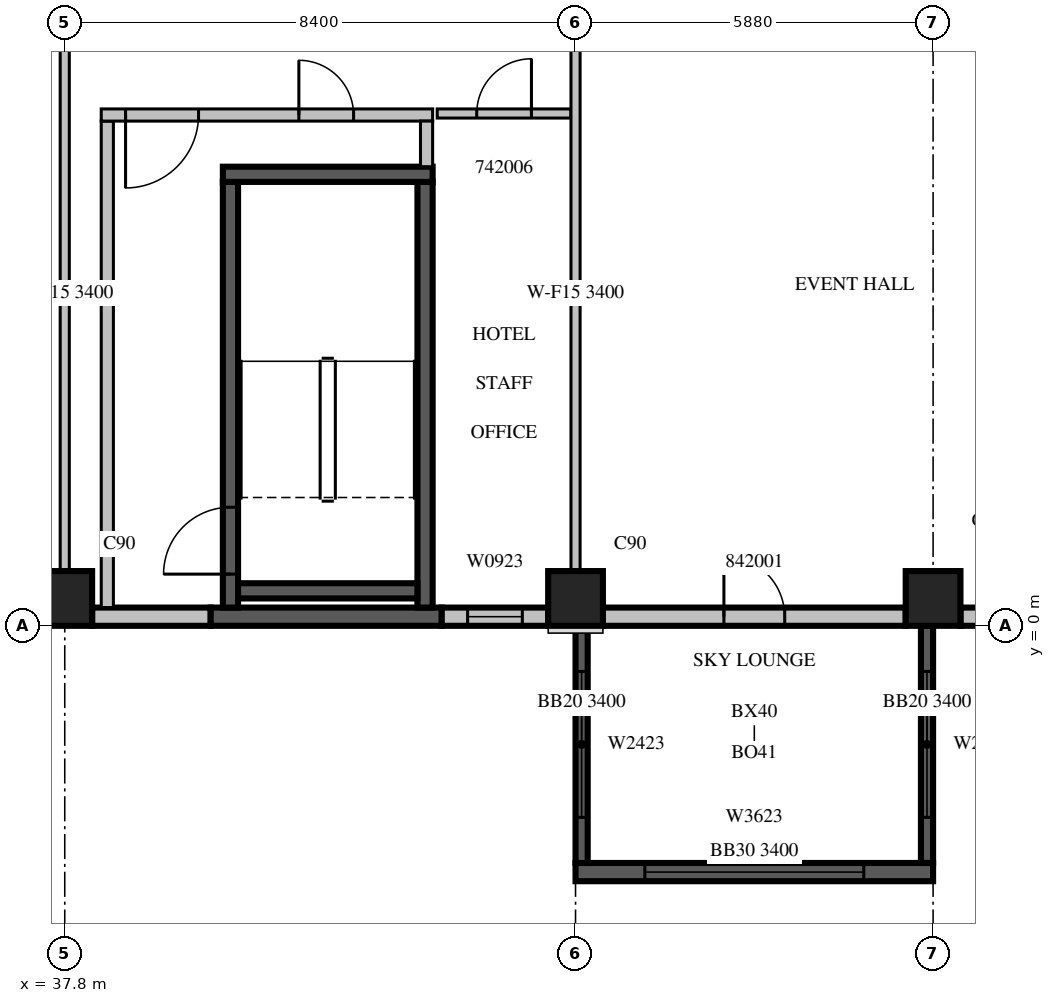
"""IFC4 building model, lengths in metres.
Left out: names, types, materials, properties, quantities, classifications, styles, units other than length and angle.
Written with IfcOpenShell. Run it as: python <this file> out.ifc"""

import sys

from ifc_helpers import new_model, si_unit, direction, frame, frame_2d, origin, origin_2d, place, context, subcontext, project, spatial, rectangle, extrude, source, transform, mapped, element, fill, save


model = new_model("IFC4")
c1 = context("Model", 3, precision=1e-05, world=origin(), true_north=direction((0.0, 1.0)))
c2 = subcontext(c1, "Body", "Model", "MODEL_VIEW")
j1 = project(units=[si_unit("LENGTHUNIT", "METRE"), si_unit("PLANEANGLEUNIT", "RADIAN")], contexts=[c1])
p1 = place(None, origin())
s1 = spatial("IfcSite", under=j1, at=p1, CompositionType="ELEMENT")
p2 = place(p1, origin())
s2 = spatial("IfcBuilding", under=s1, at=p2, CompositionType="ELEMENT")
p3 = place(p2, frame((0.0, 0.0, 193.0)))
s3 = spatial("IfcBuildingStorey", under=s2, at=p3, CompositionType="ELEMENT", Elevation=193.0)
m1 = source(origin(), c2, "Body", "SweptSolid", [
    extrude(rectangle(XDim=0.9, YDim=0.9, at=origin_2d()), origin(), (0.0, 0.0, 1.0), 3.8),
])
for number, where, z_axis, x_axis in (
    (1, (37.8, 0.45, 0.0), (0.0, 0.0, 1.0), (1.0, 0.0, 0.0)),
    (2, (46.2, 0.45, 0.0), (0.0, 0.0, 1.0), (1.0, 0.0, 0.0)),
    (3, (52.08, 0.45, 0.0), (0.0, 0.0, 1.0), (1.0, 0.0, 0.0)),
):
    element("IfcColumn", number, at=place(p3, frame(where, z_axis=z_axis, x_axis=x_axis)), inside=s3, PredefinedType="COLUMN", context=c2, shape_type="MappedRepresentation", body=[
        mapped(m1, transform((0.0, 0.0, 0.0), scale=1.0)),
    ])
m2 = source(origin(), c2, "Body", "SweptSolid", [
    extrude(rectangle(XDim=5.88, YDim=0.3, at=frame_2d((2.94, 0.0))), origin(), (0.0, 0.0, 1.0), 3.4),
])
p4 = place(p3, frame((46.2, -4.05, 0.0), z_axis=(0.0, 0.0, 1.0), x_axis=(1.0, 0.0, 0.0)))
e4 = element("IfcWall", 4, at=p4, inside=s3, PredefinedType="SOLIDWALL", context=c2, shape_type="MappedRepresentation", body=[
    mapped(m2, transform((0.0, 0.0, 0.0), scale=1.0)),
])
m3 = source(origin(), c2, "Body", "SweptSolid", [
    extrude(rectangle(XDim=3.6, YDim=2.3, at=frame_2d((1.8, 1.15))), frame((0.0, 0.16, 0.0), z_axis=(0.0, -1.0, 0.0), x_axis=(1.0, 0.0, 0.0)), (0.0, 0.0, 1.0), 0.32),
])
p5 = place(p4, frame((1.14, 0.0, 0.6)))
e5 = element("IfcOpeningElement", 5, at=p5, cuts=e4, PredefinedType="OPENING", context=c2, shape_type="MappedRepresentation", body=[
    mapped(m3, transform((0.0, 0.0, 0.0), scale=1.0)),
])
m4 = source(origin(), c2, "Body", "SweptSolid", [
    extrude(rectangle(XDim=3.9, YDim=0.2, at=frame_2d((1.95, 0.0))), origin(), (0.0, 0.0, 1.0), 3.4),
])
p6 = place(p3, frame((46.3, 0.0, 0.0), z_axis=(0.0, 0.0, 1.0), x_axis=(0.0, -1.0, 0.0)))
e6 = element("IfcWall", 6, at=p6, inside=s3, PredefinedType="SOLIDWALL", context=c2, shape_type="MappedRepresentation", body=[
    mapped(m4, transform((0.0, 0.0, 0.0), scale=1.0)),
])
m5 = source(origin(), c2, "Body", "SweptSolid", [
    extrude(rectangle(XDim=2.4, YDim=2.3, at=frame_2d((1.2, 1.15))), frame((0.0, 0.11, 0.0), z_axis=(0.0, -1.0, 0.0), x_axis=(1.0, 0.0, 0.0)), (0.0, 0.0, 1.0), 0.22),
])
p7 = place(p6, frame((0.75, 0.0, 0.6)))
e7 = element("IfcOpeningElement", 7, at=p7, cuts=e6, PredefinedType="OPENING", context=c2, shape_type="MappedRepresentation", body=[
    mapped(m5, transform((0.0, 0.0, 0.0), scale=1.0)),
])
p8 = place(p3, frame((51.98, 0.0, 0.0), z_axis=(0.0, 0.0, 1.0), x_axis=(0.0, -1.0, 0.0)))
e8 = element("IfcWall", 8, at=p8, inside=s3, PredefinedType="SOLIDWALL", context=c2, shape_type="MappedRepresentation", body=[
    mapped(m4, transform((0.0, 0.0, 0.0), scale=1.0)),
])
p9 = place(p8, frame((0.75, 0.0, 0.6)))
e9 = element("IfcOpeningElement", 9, at=p9, cuts=e8, PredefinedType="OPENING", context=c2, shape_type="MappedRepresentation", body=[
    mapped(m5, transform((0.0, 0.0, 0.0), scale=1.0)),
])
m6 = source(origin(), c2, "Body", "SweptSolid", [
    extrude(rectangle(XDim=1.95, YDim=0.3, at=frame_2d((0.975, 0.0))), origin(), (0.0, 0.0, 1.0), 3.4),
])
p10 = place(p3, frame((38.25, 0.15, 0.0), z_axis=(0.0, 0.0, 1.0), x_axis=(1.0, 0.0, 0.0)))
e10 = element("IfcWall", 10, at=p10, inside=s3, PredefinedType="STANDARD", context=c2, shape_type="MappedRepresentation", body=[
    mapped(m6, transform((0.0, 0.0, 0.0), scale=1.0)),
])
m7 = source(origin(), c2, "Body", "SweptSolid", [
    extrude(rectangle(XDim=3.8, YDim=0.3, at=frame_2d((1.9, 0.0))), origin(), (0.0, 0.0, 1.0), 3.4),
])
p11 = place(p3, frame((40.2, 0.15, 0.0), z_axis=(0.0, 0.0, 1.0), x_axis=(1.0, 0.0, 0.0)))
e11 = element("IfcWall", 11, at=p11, inside=s3, PredefinedType="SOLIDWALL", context=c2, shape_type="MappedRepresentation", body=[
    mapped(m7, transform((0.0, 0.0, 0.0), scale=1.0)),
])
m8 = source(origin(), c2, "Body", "SweptSolid", [
    extrude(rectangle(XDim=1.75, YDim=0.3, at=frame_2d((0.875, 0.0))), origin(), (0.0, 0.0, 1.0), 3.4),
])
p12 = place(p3, frame((44.0, 0.15, 0.0), z_axis=(0.0, 0.0, 1.0), x_axis=(1.0, 0.0, 0.0)))
e12 = element("IfcWall", 12, at=p12, inside=s3, PredefinedType="STANDARD", context=c2, shape_type="MappedRepresentation", body=[
    mapped(m8, transform((0.0, 0.0, 0.0), scale=1.0)),
])
m9 = source(origin(), c2, "Body", "SweptSolid", [
    extrude(rectangle(XDim=0.9, YDim=2.3, at=frame_2d((0.45, 1.15))), frame((0.0, 0.16, 0.0), z_axis=(0.0, -1.0, 0.0), x_axis=(1.0, 0.0, 0.0)), (0.0, 0.0, 1.0), 0.32),
])
p13 = place(p12, frame((0.425, 0.0, 0.6)))
e13 = element("IfcOpeningElement", 13, at=p13, cuts=e12, PredefinedType="OPENING", context=c2, shape_type="MappedRepresentation", body=[
    mapped(m9, transform((0.0, 0.0, 0.0), scale=1.0)),
])
m10 = source(origin(), c2, "Body", "SweptSolid", [
    extrude(rectangle(XDim=4.98, YDim=0.3, at=frame_2d((2.49, 0.0))), origin(), (0.0, 0.0, 1.0), 3.4),
])
p14 = place(p3, frame((46.65, 0.15, 0.0), z_axis=(0.0, 0.0, 1.0), x_axis=(1.0, 0.0, 0.0)))
e14 = element("IfcWall", 14, at=p14, inside=s3, PredefinedType="STANDARD", context=c2, shape_type="MappedRepresentation", body=[
    mapped(m10, transform((0.0, 0.0, 0.0), scale=1.0)),
])
m11 = source(origin(), c2, "Body", "SweptSolid", [
    extrude(rectangle(XDim=1.0, YDim=2.1, at=frame_2d((0.5, 1.05))), frame((0.0, 0.16, 0.0), z_axis=(0.0, -1.0, 0.0), x_axis=(1.0, 0.0, 0.0)), (0.0, 0.0, 1.0), 0.32),
])
p15 = place(p14, frame((1.99, 0.0, 0.0)))
e15 = element("IfcOpeningElement", 15, at=p15, cuts=e14, PredefinedType="OPENING", context=c2, shape_type="MappedRepresentation", body=[
    mapped(m11, transform((0.0, 0.0, 0.0), scale=1.0)),
])
m12 = source(origin(), c2, "Body", "SweptSolid", [
    extrude(rectangle(XDim=2.91, YDim=0.3, at=frame_2d((1.455, 0.0))), origin(), (0.0, 0.0, 1.0), 3.4),
])
p16 = place(p3, frame((52.53, 0.15, 0.0), z_axis=(0.0, 0.0, 1.0), x_axis=(1.0, 0.0, 0.0)))
e16 = element("IfcWall", 16, at=p16, inside=s3, PredefinedType="STANDARD", context=c2, shape_type="MappedRepresentation", body=[
    mapped(m12, transform((0.0, 0.0, 0.0), scale=1.0)),
])
m13 = source(origin(), c2, "Body", "SweptSolid", [
    extrude(rectangle(XDim=1.8, YDim=2.3, at=frame_2d((0.9, 1.15))), frame((0.0, 0.16, 0.0), z_axis=(0.0, -1.0, 0.0), x_axis=(1.0, 0.0, 0.0)), (0.0, 0.0, 1.0), 0.32),
])
p17 = place(p16, frame((0.33, 0.0, 0.6)))
e17 = element("IfcOpeningElement", 17, at=p17, cuts=e16, PredefinedType="OPENING", context=c2, shape_type="MappedRepresentation", body=[
    mapped(m13, transform((0.0, 0.0, 0.0), scale=1.0)),
])
m14 = source(origin(), c2, "Body", "SweptSolid", [
    extrude(rectangle(XDim=7.0, YDim=0.25, at=frame_2d((3.5, 0.0))), origin(), (0.0, 0.0, 1.0), 3.4),
])
p18 = place(p3, frame((40.525, 0.3, 0.0), z_axis=(0.0, 0.0, 1.0), x_axis=(0.0, 1.0, 0.0)))
e18 = element("IfcWall", 18, at=p18, inside=s3, PredefinedType="SOLIDWALL", context=c2, shape_type="MappedRepresentation", body=[
    mapped(m14, transform((0.0, 0.0, 0.0), scale=1.0)),
])
m15 = source(origin(), c2, "Body", "SweptSolid", [
    extrude(rectangle(XDim=1.1, YDim=2.1, at=frame_2d((0.55, 1.05))), frame((0.0, 0.135, 0.0), z_axis=(0.0, -1.0, 0.0), x_axis=(1.0, 0.0, 0.0)), (0.0, 0.0, 1.0), 0.27),
])
p19 = place(p18, frame((0.55, 0.0, 0.0)))
e19 = element("IfcOpeningElement", 19, at=p19, cuts=e18, PredefinedType="OPENING", context=c2, shape_type="MappedRepresentation", body=[
    mapped(m15, transform((0.0, 0.0, 0.0), scale=1.0)),
])
p20 = place(p3, frame((43.725, 0.3, 0.0), z_axis=(0.0, 0.0, 1.0), x_axis=(0.0, 1.0, 0.0)))
e20 = element("IfcWall", 20, at=p20, inside=s3, PredefinedType="SOLIDWALL", context=c2, shape_type="MappedRepresentation", body=[
    mapped(m14, transform((0.0, 0.0, 0.0), scale=1.0)),
])
m16 = source(origin(), c2, "Body", "SweptSolid", [
    extrude(rectangle(XDim=3.45, YDim=0.25, at=frame_2d((1.725, 0.0))), origin(), (0.0, 0.0, 1.0), 3.4),
])
p21 = place(p3, frame((40.4, 7.425, 0.0), z_axis=(0.0, 0.0, 1.0), x_axis=(1.0, 0.0, 0.0)))
e21 = element("IfcWall", 21, at=p21, inside=s3, PredefinedType="SOLIDWALL", context=c2, shape_type="MappedRepresentation", body=[
    mapped(m16, transform((0.0, 0.0, 0.0), scale=1.0)),
])
m17 = source(origin(), c2, "Body", "SweptSolid", [
    extrude(rectangle(XDim=2.95, YDim=0.25, at=frame_2d((1.475, 0.0))), origin(), (0.0, 0.0, 1.0), 3.4),
])
p22 = place(p3, frame((40.65, 0.575, 0.0), z_axis=(0.0, 0.0, 1.0), x_axis=(1.0, 0.0, 0.0)))
e22 = element("IfcWall", 22, at=p22, inside=s3, PredefinedType="SOLIDWALL", context=c2, shape_type="MappedRepresentation", body=[
    mapped(m17, transform((0.0, 0.0, 0.0), scale=1.0)),
])
m18 = source(origin(), c2, "Body", "SweptSolid", [
    extrude(rectangle(XDim=8.0, YDim=0.2, at=frame_2d((4.0, 0.0))), origin(), (0.0, 0.0, 1.0), 3.4),
])
p23 = place(p3, frame((38.5, 0.3, 0.0), z_axis=(0.0, 0.0, 1.0), x_axis=(0.0, 1.0, 0.0)))
e23 = element("IfcWall", 23, at=p23, inside=s3, PredefinedType="PARTITIONING", context=c2, shape_type="MappedRepresentation", body=[
    mapped(m18, transform((0.0, 0.0, 0.0), scale=1.0)),
])
m19 = source(origin(), c2, "Body", "SweptSolid", [
    extrude(rectangle(XDim=5.45, YDim=0.2, at=frame_2d((2.725, 0.0))), origin(), (0.0, 0.0, 1.0), 3.4),
])
p24 = place(p3, frame((38.4, 8.4, 0.0), z_axis=(0.0, 0.0, 1.0), x_axis=(1.0, 0.0, 0.0)))
e24 = element("IfcWall", 24, at=p24, inside=s3, PredefinedType="PARTITIONING", context=c2, shape_type="MappedRepresentation", body=[
    mapped(m19, transform((0.0, 0.0, 0.0), scale=1.0)),
])
m20 = source(origin(), c2, "Body", "SweptSolid", [
    extrude(rectangle(XDim=1.2, YDim=2.1, at=frame_2d((0.6, 1.05))), frame((0.0, 0.11, 0.0), z_axis=(0.0, -1.0, 0.0), x_axis=(1.0, 0.0, 0.0)), (0.0, 0.0, 1.0), 0.22),
])
p25 = place(p24, frame((0.4, 0.0, 0.0)))
e25 = element("IfcOpeningElement", 25, at=p25, cuts=e24, PredefinedType="OPENING", context=c2, shape_type="MappedRepresentation", body=[
    mapped(m20, transform((0.0, 0.0, 0.0), scale=1.0)),
])
m21 = source(origin(), c2, "Body", "SweptSolid", [
    extrude(rectangle(XDim=0.9, YDim=2.1, at=frame_2d((0.45, 1.05))), frame((0.0, 0.11, 0.0), z_axis=(0.0, -1.0, 0.0), x_axis=(1.0, 0.0, 0.0)), (0.0, 0.0, 1.0), 0.22),
])
p26 = place(p24, frame((3.25, 0.0, 0.0)))
e26 = element("IfcOpeningElement", 26, at=p26, cuts=e24, PredefinedType="OPENING", context=c2, shape_type="MappedRepresentation", body=[
    mapped(m21, transform((0.0, 0.0, 0.0), scale=1.0)),
])
m22 = source(origin(), c2, "Body", "SweptSolid", [
    extrude(rectangle(XDim=0.75, YDim=0.2, at=frame_2d((0.375, 0.0))), origin(), (0.0, 0.0, 1.0), 3.4),
])
p27 = place(p3, frame((43.75, 7.55, 0.0), z_axis=(0.0, 0.0, 1.0), x_axis=(0.0, 1.0, 0.0)))
e27 = element("IfcWall", 27, at=p27, inside=s3, PredefinedType="PARTITIONING", context=c2, shape_type="MappedRepresentation", body=[
    mapped(m22, transform((0.0, 0.0, 0.0), scale=1.0)),
])
m23 = source(origin(), c2, "Body", "SweptSolid", [
    extrude(rectangle(XDim=2.2, YDim=0.15, at=frame_2d((1.1, 0.0))), origin(), (0.0, 0.0, 1.0), 3.4),
])
p28 = place(p3, frame((46.125, 8.425, 0.0), z_axis=(0.0, 0.0, 1.0), x_axis=(-1.0, 0.0, 0.0)))
e28 = element("IfcWall", 28, at=p28, inside=s3, PredefinedType="PARTITIONING", context=c2, shape_type="MappedRepresentation", body=[
    mapped(m23, transform((0.0, 0.0, 0.0), scale=1.0)),
])
m24 = source(origin(), c2, "Body", "SweptSolid", [
    extrude(rectangle(XDim=0.9, YDim=2.1, at=frame_2d((0.45, 1.05))), frame((0.0, 0.085, 0.0), z_axis=(0.0, -1.0, 0.0), x_axis=(1.0, 0.0, 0.0)), (0.0, 0.0, 1.0), 0.17),
])
p29 = place(p28, frame((0.65, 0.0, 0.0)))
e29 = element("IfcOpeningElement", 29, at=p29, cuts=e28, PredefinedType="OPENING", context=c2, shape_type="MappedRepresentation", body=[
    mapped(m24, transform((0.0, 0.0, 0.0), scale=1.0)),
])
m25 = source(origin(), c2, "Body", "SweptSolid", [
    extrude(rectangle(XDim=9.152, YDim=0.15, at=frame_2d((4.576, 0.0))), origin(), (0.0, 0.0, 1.0), 3.4),
])
for number, where, z_axis, x_axis in (
    (30, (37.8, 0.899, 0.0), (0.0, 0.0, 1.0), (0.0, 1.0, 0.0)),
    (31, (46.2, 0.899, 0.0), (0.0, 0.0, 1.0), (0.0, 1.0, 0.0)),
):
    element("IfcWall", number, at=place(p3, frame(where, z_axis=z_axis, x_axis=x_axis)), inside=s3, PredefinedType="PARTITIONING", context=c2, shape_type="MappedRepresentation", body=[
        mapped(m25, transform((0.0, 0.0, 0.0), scale=1.0)),
    ])
m26 = source(origin(), c2, "Body", "SweptSolid", [
    extrude(rectangle(XDim=3.6, YDim=2.3, at=frame_2d((1.8, 1.15))), frame((0.0, 0.03, 0.0), z_axis=(0.0, -1.0, 0.0), x_axis=(1.0, 0.0, 0.0)), (0.0, 0.0, 1.0), 0.06),
])
p30 = place(p5, origin())
e32 = element("IfcWindow", 32, at=p30, inside=s3, PartitioningType="SINGLE_PANEL", PredefinedType="WINDOW", context=c2, shape_type="MappedRepresentation", body=[
    mapped(m26, transform((0.0, 0.0, 0.0), scale=1.0)),
])
fill(e5, e32)
m27 = source(origin(), c2, "Body", "SweptSolid", [
    extrude(rectangle(XDim=2.4, YDim=2.3, at=frame_2d((1.2, 1.15))), frame((0.0, 0.03, 0.0), z_axis=(0.0, -1.0, 0.0), x_axis=(1.0, 0.0, 0.0)), (0.0, 0.0, 1.0), 0.06),
])
p31 = place(p7, origin())
e33 = element("IfcWindow", 33, at=p31, inside=s3, PartitioningType="SINGLE_PANEL", PredefinedType="WINDOW", context=c2, shape_type="MappedRepresentation", body=[
    mapped(m27, transform((0.0, 0.0, 0.0), scale=1.0)),
])
fill(e7, e33)
p32 = place(p9, origin())
e34 = element("IfcWindow", 34, at=p32, inside=s3, PartitioningType="SINGLE_PANEL", PredefinedType="WINDOW", context=c2, shape_type="MappedRepresentation", body=[
    mapped(m27, transform((0.0, 0.0, 0.0), scale=1.0)),
])
fill(e9, e34)
m28 = source(origin(), c2, "Body", "SweptSolid", [
    extrude(rectangle(XDim=0.9, YDim=2.3, at=frame_2d((0.45, 1.15))), frame((0.0, 0.03, 0.0), z_axis=(0.0, -1.0, 0.0), x_axis=(1.0, 0.0, 0.0)), (0.0, 0.0, 1.0), 0.06),
])
p33 = place(p13, origin())
e35 = element("IfcWindow", 35, at=p33, inside=s3, PartitioningType="SINGLE_PANEL", PredefinedType="WINDOW", context=c2, shape_type="MappedRepresentation", body=[
    mapped(m28, transform((0.0, 0.0, 0.0), scale=1.0)),
])
fill(e13, e35)
m29 = source(origin(), c2, "Body", "SweptSolid", [
    extrude(rectangle(XDim=1.1, YDim=2.1, at=frame_2d((0.55, 1.05))), frame((0.0, 0.025, 0.0), z_axis=(0.0, -1.0, 0.0), x_axis=(1.0, 0.0, 0.0)), (0.0, 0.0, 1.0), 0.05),
])
p34 = place(p19, origin())
e36 = element("IfcDoor", 36, at=p34, inside=s3, OperationType="SINGLE_SWING_LEFT", PredefinedType="DOOR", context=c2, shape_type="MappedRepresentation", body=[
    mapped(m29, transform((0.0, 0.0, 0.0), scale=1.0)),
])
fill(e19, e36)
m30 = source(origin(), c2, "Body", "SweptSolid", [
    extrude(rectangle(XDim=1.2, YDim=2.1, at=frame_2d((0.6, 1.05))), frame((0.0, 0.025, 0.0), z_axis=(0.0, -1.0, 0.0), x_axis=(1.0, 0.0, 0.0)), (0.0, 0.0, 1.0), 0.05),
])
p35 = place(p25, origin())
e37 = element("IfcDoor", 37, at=p35, inside=s3, OperationType="SINGLE_SWING_RIGHT", PredefinedType="DOOR", context=c2, shape_type="MappedRepresentation", body=[
    mapped(m30, transform((0.0, 0.0, 0.0), scale=1.0)),
])
fill(e25, e37)
m31 = source(origin(), c2, "Body", "SweptSolid", [
    extrude(rectangle(XDim=0.9, YDim=2.1, at=frame_2d((0.45, 1.05))), frame((0.0, 0.025, 0.0), z_axis=(0.0, -1.0, 0.0), x_axis=(1.0, 0.0, 0.0)), (0.0, 0.0, 1.0), 0.05),
])
p36 = place(p26, origin())
e38 = element("IfcDoor", 38, at=p36, inside=s3, OperationType="SINGLE_SWING_LEFT", PredefinedType="DOOR", context=c2, shape_type="MappedRepresentation", body=[
    mapped(m31, transform((0.0, 0.0, 0.0), scale=1.0)),
])
fill(e26, e38)
p37 = place(p29, origin())
e39 = element("IfcDoor", 39, at=p37, inside=s3, OperationType="SINGLE_SWING_RIGHT", PredefinedType="DOOR", context=c2, shape_type="MappedRepresentation", body=[
    mapped(m31, transform((0.0, 0.0, 0.0), scale=1.0)),
])
fill(e29, e39)
m32 = source(origin(), c2, "Body", "SweptSolid", [
    extrude(rectangle(XDim=1.0, YDim=2.1, at=frame_2d((0.5, 1.05))), frame((0.0, 0.025, 0.0), z_axis=(0.0, -1.0, 0.0), x_axis=(1.0, 0.0, 0.0)), (0.0, 0.0, 1.0), 0.05),
])
p38 = place(p15, origin())
e40 = element("IfcDoor", 40, at=p38, inside=s3, OperationType="SINGLE_SWING_LEFT", PredefinedType="DOOR", context=c2, shape_type="MappedRepresentation", body=[
    mapped(m32, transform((0.0, 0.0, 0.0), scale=1.0)),
])
fill(e15, e40)
save(model, sys.argv[1])
